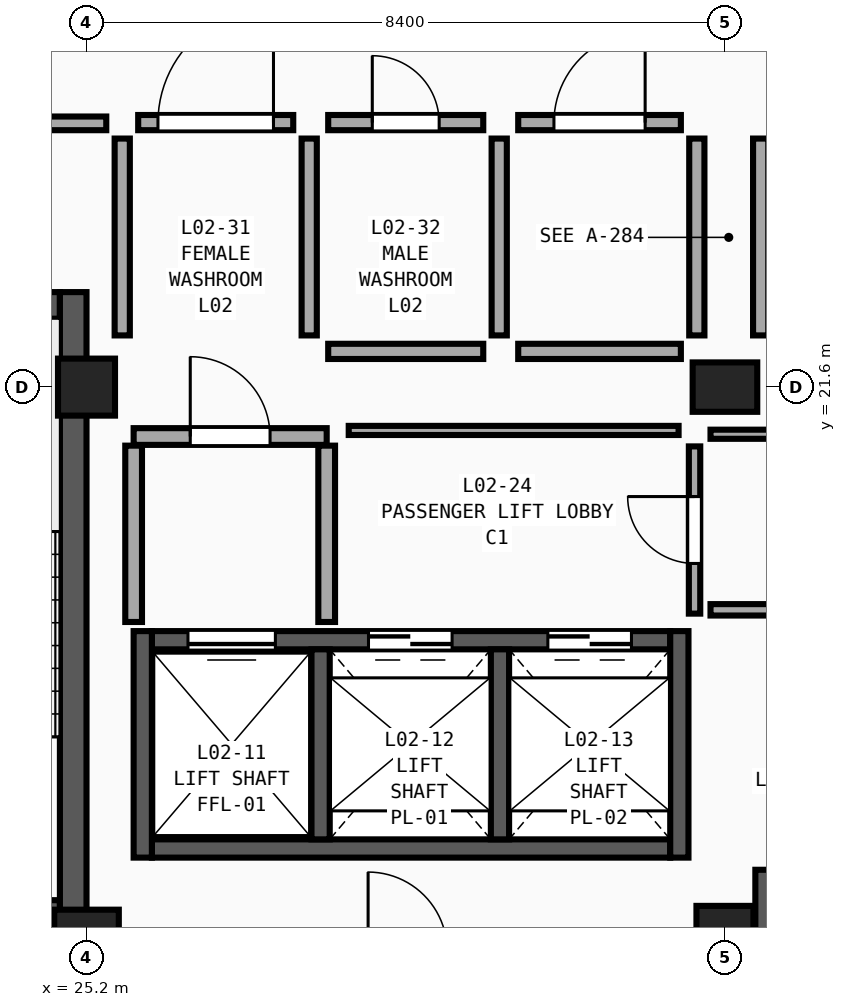
"""IFC4 building model, lengths in metres.
Left out: names, types, materials, properties, quantities, classifications, styles, units other than length and angle.
Written with IfcOpenShell. Run it as: python <this file> out.ifc"""

import sys

from ifc_helpers import new_model, si_unit, direction, frame, frame_2d, origin, origin_2d, place, context, subcontext, project, spatial, rectangle, extrude, element, fill, save


model = new_model("IFC4")
c1 = context("Model", 3, precision=1e-05, world=origin(), true_north=direction((0.0, 1.0)))
c2 = subcontext(c1, "Body", "Model", "MODEL_VIEW")
j1 = project(units=[si_unit("LENGTHUNIT", "METRE"), si_unit("PLANEANGLEUNIT", "RADIAN")], contexts=[c1])
p1 = place(None, origin())
s1 = spatial("IfcSite", under=j1, at=p1, CompositionType="ELEMENT")
p2 = place(p1, origin())
s2 = spatial("IfcBuilding", under=s1, at=p2, CompositionType="ELEMENT")
p3 = place(p2, frame((0.0, 0.0, 9.9)))
s3 = spatial("IfcBuildingStorey", under=s2, at=p3, CompositionType="ELEMENT", Elevation=9.9)
p4 = place(p3, frame((25.2, 14.4, 0.0), z_axis=(0.0, 0.0, 1.0), x_axis=(1.0, 0.0, 0.0)))
e1 = element("IfcColumn", 1, at=p4, inside=s3, PredefinedType="COLUMN", context=c2, shape_type="SweptSolid", body=[
    extrude(rectangle(XDim=0.85, YDim=0.65, at=origin_2d()), origin(), (0.0, 0.0, 1.0), 4.5),
])
for number, where, z_axis, x_axis in (
    (2, (25.2, 21.6, 0.0), (0.0, 0.0, 1.0), (1.0, 0.0, 0.0)),
    (3, (33.6, 14.4, 0.0), (0.0, 0.0, 1.0), (1.0, 0.0, 0.0)),
):
    element("IfcColumn", number, at=place(p3, frame(where, z_axis=z_axis, x_axis=x_axis)), inside=s3, PredefinedType="COLUMN", context=c2, shape_type="SweptSolid", body=[
        extrude(rectangle(XDim=0.75, YDim=0.75, at=origin_2d()), origin(), (0.0, 0.0, 1.0), 4.5),
    ])
p5 = place(p3, frame((33.6, 21.6, 0.0), z_axis=(0.0, 0.0, 1.0), x_axis=(1.0, 0.0, 0.0)))
e4 = element("IfcColumn", 4, at=p5, inside=s3, PredefinedType="COLUMN", context=c2, shape_type="SweptSolid", body=[
    extrude(rectangle(XDim=0.85, YDim=0.65, at=origin_2d()), origin(), (0.0, 0.0, 1.0), 4.5),
])
p6 = place(p3, frame((24.85, 14.675, 0.0), z_axis=(0.0, 0.0, 1.0), x_axis=(-1.0, 0.0, 0.0)))
e5 = element("IfcWall", 5, at=p6, inside=s3, PredefinedType="SHEAR", context=c2, shape_type="SweptSolid", body=[
    extrude(rectangle(XDim=7.7, YDim=0.35, at=frame_2d((3.85, 0.0))), origin(), (0.0, 0.0, 1.0), 4.5),
])
p7 = place(p6, frame((3.3, 0.0, 0.0)))
e6 = element("IfcOpeningElement", 6, at=p7, cuts=e5, PredefinedType="OPENING", context=c2, shape_type="SweptSolid", body=[
    extrude(rectangle(XDim=1.1, YDim=2.2, at=frame_2d((0.55, 1.1))), frame((0.0, 0.195, 0.0), z_axis=(0.0, -1.0, 0.0), x_axis=(1.0, 0.0, 0.0)), (0.0, 0.0, 1.0), 0.39),
])
p8 = place(p3, frame((17.15, 22.675, 0.0), z_axis=(0.0, 0.0, 1.0), x_axis=(1.0, 0.0, 0.0)))
e7 = element("IfcWall", 7, at=p8, inside=s3, PredefinedType="SHEAR", context=c2, shape_type="SweptSolid", body=[
    extrude(rectangle(XDim=7.7, YDim=0.35, at=frame_2d((3.85, 0.0))), origin(), (0.0, 0.0, 1.0), 4.5),
])
p9 = place(p3, frame((25.025, 14.5, 0.0), z_axis=(0.0, 0.0, 1.0), x_axis=(0.0, 1.0, 0.0)))
e8 = element("IfcWall", 8, at=p9, inside=s3, PredefinedType="SHEAR", context=c2, shape_type="SweptSolid", body=[
    extrude(rectangle(XDim=8.35, YDim=0.35, at=frame_2d((4.175, 0.0))), origin(), (0.0, 0.0, 1.0), 4.5),
])
p10 = place(p3, frame((34.175, 15.25, 0.0), z_axis=(0.0, 0.0, 1.0), x_axis=(0.0, -1.0, 0.0)))
e9 = element("IfcWall", 9, at=p10, inside=s3, PredefinedType="SHEAR", context=c2, shape_type="SweptSolid", body=[
    extrude(rectangle(XDim=7.95, YDim=0.35, at=frame_2d((3.975, 0.0))), origin(), (0.0, 0.0, 1.0), 4.5),
])
p11 = place(p3, frame((32.88, 18.27, 0.0), z_axis=(0.0, 0.0, 1.0), x_axis=(-1.0, 0.0, 0.0)))
e10 = element("IfcWall", 10, at=p11, inside=s3, PredefinedType="SHEAR", context=c2, shape_type="SweptSolid", body=[
    extrude(rectangle(XDim=6.82, YDim=0.24, at=frame_2d((3.41, 0.0))), origin(), (0.0, 0.0, 1.0), 4.18),
])
p12 = place(p11, frame((5.195, 0.0, 0.0)))
e11 = element("IfcOpeningElement", 11, at=p12, cuts=e10, PredefinedType="OPENING", context=c2, shape_type="SweptSolid", body=[
    extrude(rectangle(XDim=1.15, YDim=2.25, at=frame_2d((0.575, 1.125))), frame((0.0, 0.14, 0.0), z_axis=(0.0, -1.0, 0.0), x_axis=(1.0, 0.0, 0.0)), (0.0, 0.0, 1.0), 0.28),
])
p13 = place(p11, frame((2.87, 0.0, 0.0)))
e12 = element("IfcOpeningElement", 12, at=p13, cuts=e10, PredefinedType="OPENING", context=c2, shape_type="SweptSolid", body=[
    extrude(rectangle(XDim=1.1, YDim=2.2, at=frame_2d((0.55, 1.1))), frame((0.0, 0.14, 0.0), z_axis=(0.0, -1.0, 0.0), x_axis=(1.0, 0.0, 0.0)), (0.0, 0.0, 1.0), 0.28),
])
p14 = place(p11, frame((0.51, 0.0, 0.0)))
e13 = element("IfcOpeningElement", 13, at=p14, cuts=e10, PredefinedType="OPENING", context=c2, shape_type="SweptSolid", body=[
    extrude(rectangle(XDim=1.1, YDim=2.2, at=frame_2d((0.55, 1.1))), frame((0.0, 0.14, 0.0), z_axis=(0.0, -1.0, 0.0), x_axis=(1.0, 0.0, 0.0)), (0.0, 0.0, 1.0), 0.28),
])
p15 = place(p3, frame((26.06, 15.53, 0.0), z_axis=(0.0, 0.0, 1.0), x_axis=(1.0, 0.0, 0.0)))
e14 = element("IfcWall", 14, at=p15, inside=s3, PredefinedType="SHEAR", context=c2, shape_type="SweptSolid", body=[
    extrude(rectangle(XDim=6.82, YDim=0.24, at=frame_2d((3.41, 0.0))), origin(), (0.0, 0.0, 1.0), 4.18),
])
for number, where, z_axis, x_axis in (
    (15, (25.94, 18.39, 0.0), (0.0, 0.0, 1.0), (0.0, -1.0, 0.0)),
    (16, (33.0, 15.41, 0.0), (0.0, 0.0, 1.0), (0.0, 1.0, 0.0)),
):
    element("IfcWall", number, at=place(p3, frame(where, z_axis=z_axis, x_axis=x_axis)), inside=s3, PredefinedType="SHEAR", context=c2, shape_type="SweptSolid", body=[
        extrude(rectangle(XDim=2.98, YDim=0.24, at=frame_2d((1.49, 0.0))), origin(), (0.0, 0.0, 1.0), 4.18),
    ])
for number, where, z_axis, x_axis in (
    (17, (28.28, 15.65, 0.0), (0.0, 0.0, 1.0), (0.0, 1.0, 0.0)),
    (18, (30.64, 15.65, 0.0), (0.0, 0.0, 1.0), (0.0, 1.0, 0.0)),
):
    element("IfcWall", number, at=place(p3, frame(where, z_axis=z_axis, x_axis=x_axis)), inside=s3, PredefinedType="SHEAR", context=c2, shape_type="SweptSolid", body=[
        extrude(rectangle(XDim=2.5, YDim=0.24, at=frame_2d((1.25, 0.0))), origin(), (0.0, 0.0, 1.0), 4.18),
    ])
p16 = place(p3, frame((25.82, 20.95, 0.0), z_axis=(0.0, 0.0, 1.0), x_axis=(1.0, 0.0, 0.0)))
e19 = element("IfcWall", 19, at=p16, inside=s3, PredefinedType="SOLIDWALL", context=c2, shape_type="SweptSolid", body=[
    extrude(rectangle(XDim=2.54, YDim=0.22, at=frame_2d((1.27, 0.0))), origin(), (0.0, 0.0, 1.0), 3.73),
])
p17 = place(p16, frame((0.745, 0.0, 0.0)))
e20 = element("IfcOpeningElement", 20, at=p17, cuts=e19, PredefinedType="OPENING", context=c2, shape_type="SweptSolid", body=[
    extrude(rectangle(XDim=1.05, YDim=2.15, at=frame_2d((0.525, 1.075))), frame((0.0, 0.13, 0.0), z_axis=(0.0, -1.0, 0.0), x_axis=(1.0, 0.0, 0.0)), (0.0, 0.0, 1.0), 0.26),
])
for number, where, z_axis, x_axis in (
    (21, (25.82, 18.51, 0.0), (0.0, 0.0, 1.0), (0.0, 1.0, 0.0)),
    (22, (28.36, 18.51, 0.0), (0.0, 0.0, 1.0), (0.0, 1.0, 0.0)),
):
    element("IfcWall", number, at=place(p3, frame(where, z_axis=z_axis, x_axis=x_axis)), inside=s3, PredefinedType="SOLIDWALL", context=c2, shape_type="SweptSolid", body=[
        extrude(rectangle(XDim=2.32, YDim=0.22, at=frame_2d((1.16, 0.0))), origin(), (0.0, 0.0, 1.0), 4.18),
    ])
p18 = place(p3, frame((28.65, 21.03, 0.0), z_axis=(0.0, 0.0, 1.0), x_axis=(1.0, 0.0, 0.0)))
e23 = element("IfcWall", 23, at=p18, inside=s3, PredefinedType="PARTITIONING", context=c2, shape_type="SweptSolid", body=[
    extrude(rectangle(XDim=4.34, YDim=0.12, at=frame_2d((2.17, 0.0))), origin(), (0.0, 0.0, 1.0), 3.73),
])
p19 = place(p3, frame((22.24, 25.07, 0.0), z_axis=(0.0, 0.0, 1.0), x_axis=(1.0, 0.0, 0.0)))
e24 = element("IfcWall", 24, at=p19, inside=s3, PredefinedType="PARTITIONING", context=c2, shape_type="SweptSolid", body=[
    extrude(rectangle(XDim=3.22, YDim=0.18, at=frame_2d((1.61, 0.0))), origin(), (0.0, 0.0, 1.0), 4.18),
])
p20 = place(p19, frame((1.09, 0.0, 0.0)))
e25 = element("IfcOpeningElement", 25, at=p20, cuts=e24, PredefinedType="OPENING", context=c2, shape_type="SweptSolid", body=[
    extrude(rectangle(XDim=1.04, YDim=2.21, at=frame_2d((0.52, 1.105))), frame((0.0, 0.11, 0.0), z_axis=(0.0, -1.0, 0.0), x_axis=(1.0, 0.0, 0.0)), (0.0, 0.0, 1.0), 0.22),
])
p21 = place(p3, frame((33.41, 18.67, 0.0), z_axis=(0.0, 0.0, 1.0), x_axis=(1.0, 0.0, 0.0)))
e26 = element("IfcWall", 26, at=p21, inside=s3, PredefinedType="PARTITIONING", context=c2, shape_type="SweptSolid", body=[
    extrude(rectangle(XDim=3.16, YDim=0.15, at=frame_2d((1.58, 0.0))), origin(), (0.0, 0.0, 1.0), 4.18),
])
p22 = place(p21, frame((0.98, 0.0, 0.0)))
e27 = element("IfcOpeningElement", 27, at=p22, cuts=e26, PredefinedType="OPENING", context=c2, shape_type="SweptSolid", body=[
    extrude(rectangle(XDim=1.2, YDim=2.21, at=frame_2d((0.6, 1.105))), frame((0.0, 0.095, 0.0), z_axis=(0.0, -1.0, 0.0), x_axis=(1.0, 0.0, 0.0)), (0.0, 0.0, 1.0), 0.19),
])
p23 = place(p3, frame((33.41, 20.98, 0.0), z_axis=(0.0, 0.0, 1.0), x_axis=(1.0, 0.0, 0.0)))
e28 = element("IfcWall", 28, at=p23, inside=s3, PredefinedType="PARTITIONING", context=c2, shape_type="SweptSolid", body=[
    extrude(rectangle(XDim=3.0, YDim=0.12, at=frame_2d((1.5, 0.0))), origin(), (0.0, 0.0, 1.0), 3.73),
])
p24 = place(p3, frame((33.2, 18.62, 0.0), z_axis=(0.0, 0.0, 1.0), x_axis=(0.0, 1.0, 0.0)))
e29 = element("IfcWall", 29, at=p24, inside=s3, PredefinedType="PARTITIONING", context=c2, shape_type="SweptSolid", body=[
    extrude(rectangle(XDim=2.2, YDim=0.15, at=frame_2d((1.1, 0.0))), origin(), (0.0, 0.0, 1.0), 3.73),
])
p25 = place(p24, frame((0.66, 0.0, 0.0)))
e30 = element("IfcOpeningElement", 30, at=p25, cuts=e29, PredefinedType="OPENING", context=c2, shape_type="SweptSolid", body=[
    extrude(rectangle(XDim=0.88, YDim=2.05, at=frame_2d((0.44, 1.025))), frame((0.0, 0.095, 0.0), z_axis=(0.0, -1.0, 0.0), x_axis=(1.0, 0.0, 0.0)), (0.0, 0.0, 1.0), 0.19),
])
p26 = place(p3, frame((30.88, 25.08, 0.0), z_axis=(0.0, 0.0, 1.0), x_axis=(1.0, 0.0, 0.0)))
e31 = element("IfcWall", 31, at=p26, inside=s3, PredefinedType="PLUMBINGWALL", context=c2, shape_type="SweptSolid", body=[
    extrude(rectangle(XDim=2.14, YDim=0.2, at=frame_2d((1.07, 0.0))), origin(), (0.0, 0.0, 1.0), 4.18),
])
p27 = place(p26, frame((0.47, 0.0, 0.0)))
e32 = element("IfcOpeningElement", 32, at=p27, cuts=e31, PredefinedType="OPENING", context=c2, shape_type="SweptSolid", body=[
    extrude(rectangle(XDim=1.2, YDim=2.05, at=frame_2d((0.6, 1.025))), frame((0.0, 0.12, 0.0), z_axis=(0.0, -1.0, 0.0), x_axis=(1.0, 0.0, 0.0)), (0.0, 0.0, 1.0), 0.24),
])
p28 = place(p3, frame((25.88, 25.08, 0.0), z_axis=(0.0, 0.0, 1.0), x_axis=(1.0, 0.0, 0.0)))
e33 = element("IfcWall", 33, at=p28, inside=s3, PredefinedType="PLUMBINGWALL", context=c2, shape_type="SweptSolid", body=[
    extrude(rectangle(XDim=2.04, YDim=0.2, at=frame_2d((1.02, 0.0))), origin(), (0.0, 0.0, 1.0), 4.18),
])
p29 = place(p28, frame((0.26, 0.0, 0.0)))
e34 = element("IfcOpeningElement", 34, at=p29, cuts=e33, PredefinedType="OPENING", context=c2, shape_type="SweptSolid", body=[
    extrude(rectangle(XDim=1.52, YDim=2.05, at=frame_2d((0.76, 1.025))), frame((0.0, 0.12, 0.0), z_axis=(0.0, -1.0, 0.0), x_axis=(1.0, 0.0, 0.0)), (0.0, 0.0, 1.0), 0.24),
])
p30 = place(p3, frame((28.38, 25.08, 0.0), z_axis=(0.0, 0.0, 1.0), x_axis=(1.0, 0.0, 0.0)))
e35 = element("IfcWall", 35, at=p30, inside=s3, PredefinedType="PLUMBINGWALL", context=c2, shape_type="SweptSolid", body=[
    extrude(rectangle(XDim=2.04, YDim=0.2, at=frame_2d((1.02, 0.0))), origin(), (0.0, 0.0, 1.0), 4.18),
])
p31 = place(p30, frame((0.58, 0.0, 0.0)))
e36 = element("IfcOpeningElement", 36, at=p31, cuts=e35, PredefinedType="OPENING", context=c2, shape_type="SweptSolid", body=[
    extrude(rectangle(XDim=0.88, YDim=2.05, at=frame_2d((0.44, 1.025))), frame((0.0, 0.12, 0.0), z_axis=(0.0, -1.0, 0.0), x_axis=(1.0, 0.0, 0.0)), (0.0, 0.0, 1.0), 0.24),
])
for number, where, z_axis, x_axis in (
    (37, (28.13, 22.28, 0.0), (0.0, 0.0, 1.0), (0.0, 1.0, 0.0)),
    (38, (25.67, 22.28, 0.0), (0.0, 0.0, 1.0), (0.0, 1.0, 0.0)),
    (39, (30.63, 22.28, 0.0), (0.0, 0.0, 1.0), (0.0, 1.0, 0.0)),
):
    element("IfcWall", number, at=place(p3, frame(where, z_axis=z_axis, x_axis=x_axis)), inside=s3, PredefinedType="PLUMBINGWALL", context=c2, shape_type="SweptSolid", body=[
        extrude(rectangle(XDim=2.59, YDim=0.2, at=frame_2d((1.295, 0.0))), origin(), (0.0, 0.0, 1.0), 4.18),
    ])
for number, where, z_axis, x_axis in (
    (40, (33.23, 22.28, 0.0), (0.0, 0.0, 1.0), (0.0, 1.0, 0.0)),
    (41, (34.07, 22.28, 0.0), (0.0, 0.0, 1.0), (0.0, 1.0, 0.0)),
):
    element("IfcWall", number, at=place(p3, frame(where, z_axis=z_axis, x_axis=x_axis)), inside=s3, PredefinedType="PLUMBINGWALL", context=c2, shape_type="SweptSolid", body=[
        extrude(rectangle(XDim=2.59, YDim=0.2, at=frame_2d((1.295, 0.0))), origin(), (0.0, 0.0, 1.0), 3.73),
    ])
p32 = place(p3, frame((30.88, 22.07, 0.0), z_axis=(0.0, 0.0, 1.0), x_axis=(1.0, 0.0, 0.0)))
e42 = element("IfcWall", 42, at=p32, inside=s3, PredefinedType="PLUMBINGWALL", context=c2, shape_type="SweptSolid", body=[
    extrude(rectangle(XDim=2.14, YDim=0.2, at=frame_2d((1.07, 0.0))), origin(), (0.0, 0.0, 1.0), 3.73),
])
p33 = place(p3, frame((28.38, 22.07, 0.0), z_axis=(0.0, 0.0, 1.0), x_axis=(1.0, 0.0, 0.0)))
e43 = element("IfcWall", 43, at=p33, inside=s3, PredefinedType="PLUMBINGWALL", context=c2, shape_type="SweptSolid", body=[
    extrude(rectangle(XDim=2.04, YDim=0.2, at=frame_2d((1.02, 0.0))), origin(), (0.0, 0.0, 1.0), 3.73),
])
p34 = place(p12, origin())
e44 = element("IfcDoor", 44, at=p34, inside=s3, OperationType="SLIDING_TO_LEFT", PredefinedType="DOOR", context=c2, shape_type="SweptSolid", body=[
    extrude(rectangle(XDim=1.15, YDim=2.25, at=frame_2d((0.575, 1.125))), frame((0.0, 0.025, 0.0), z_axis=(0.0, -1.0, 0.0), x_axis=(1.0, 0.0, 0.0)), (0.0, 0.0, 1.0), 0.05),
])
fill(e11, e44)
p35 = place(p13, origin())
e45 = element("IfcDoor", 45, at=p35, inside=s3, OperationType="DOUBLE_DOOR_SLIDING", PredefinedType="DOOR", context=c2, shape_type="SweptSolid", body=[
    extrude(rectangle(XDim=1.1, YDim=2.2, at=frame_2d((0.55, 1.1))), frame((0.0, 0.025, 0.0), z_axis=(0.0, -1.0, 0.0), x_axis=(1.0, 0.0, 0.0)), (0.0, 0.0, 1.0), 0.05),
])
fill(e12, e45)
p36 = place(p14, origin())
e46 = element("IfcDoor", 46, at=p36, inside=s3, OperationType="DOUBLE_DOOR_SLIDING", PredefinedType="DOOR", context=c2, shape_type="SweptSolid", body=[
    extrude(rectangle(XDim=1.1, YDim=2.2, at=frame_2d((0.55, 1.1))), frame((0.0, 0.025, 0.0), z_axis=(0.0, -1.0, 0.0), x_axis=(1.0, 0.0, 0.0)), (0.0, 0.0, 1.0), 0.05),
])
fill(e13, e46)
p37 = place(p17, origin())
e47 = element("IfcDoor", 47, at=p37, inside=s3, OperationType="SINGLE_SWING_LEFT", PredefinedType="DOOR", context=c2, shape_type="SweptSolid", body=[
    extrude(rectangle(XDim=1.05, YDim=2.15, at=frame_2d((0.525, 1.075))), frame((0.0, 0.025, 0.0), z_axis=(0.0, -1.0, 0.0), x_axis=(1.0, 0.0, 0.0)), (0.0, 0.0, 1.0), 0.05),
])
fill(e20, e47)
p38 = place(p27, origin())
e48 = element("IfcDoor", 48, at=p38, inside=s3, OperationType="SINGLE_SWING_RIGHT", PredefinedType="DOOR", context=c2, shape_type="SweptSolid", body=[
    extrude(rectangle(XDim=1.2, YDim=2.05, at=frame_2d((0.6, 1.025))), frame((0.0, 0.025, 0.0), z_axis=(0.0, -1.0, 0.0), x_axis=(1.0, 0.0, 0.0)), (0.0, 0.0, 1.0), 0.05),
])
fill(e32, e48)
p39 = place(p29, origin())
e49 = element("IfcDoor", 49, at=p39, inside=s3, OperationType="SINGLE_SWING_RIGHT", PredefinedType="DOOR", context=c2, shape_type="SweptSolid", body=[
    extrude(rectangle(XDim=1.52, YDim=2.05, at=frame_2d((0.76, 1.025))), frame((0.0, 0.025, 0.0), z_axis=(0.0, -1.0, 0.0), x_axis=(1.0, 0.0, 0.0)), (0.0, 0.0, 1.0), 0.05),
])
fill(e34, e49)
p40 = place(p31, origin())
e50 = element("IfcDoor", 50, at=p40, inside=s3, OperationType="SINGLE_SWING_LEFT", PredefinedType="DOOR", context=c2, shape_type="SweptSolid", body=[
    extrude(rectangle(XDim=0.88, YDim=2.05, at=frame_2d((0.44, 1.025))), frame((0.0, 0.025, 0.0), z_axis=(0.0, -1.0, 0.0), x_axis=(1.0, 0.0, 0.0)), (0.0, 0.0, 1.0), 0.05),
])
fill(e36, e50)
p41 = place(p25, origin())
e51 = element("IfcDoor", 51, at=p41, inside=s3, OperationType="SINGLE_SWING_RIGHT", PredefinedType="DOOR", context=c2, shape_type="SweptSolid", body=[
    extrude(rectangle(XDim=0.88, YDim=2.05, at=frame_2d((0.44, 1.025))), frame((0.0, 0.025, 0.0), z_axis=(0.0, -1.0, 0.0), x_axis=(1.0, 0.0, 0.0)), (0.0, 0.0, 1.0), 0.05),
])
fill(e30, e51)
save(model, sys.argv[1])
